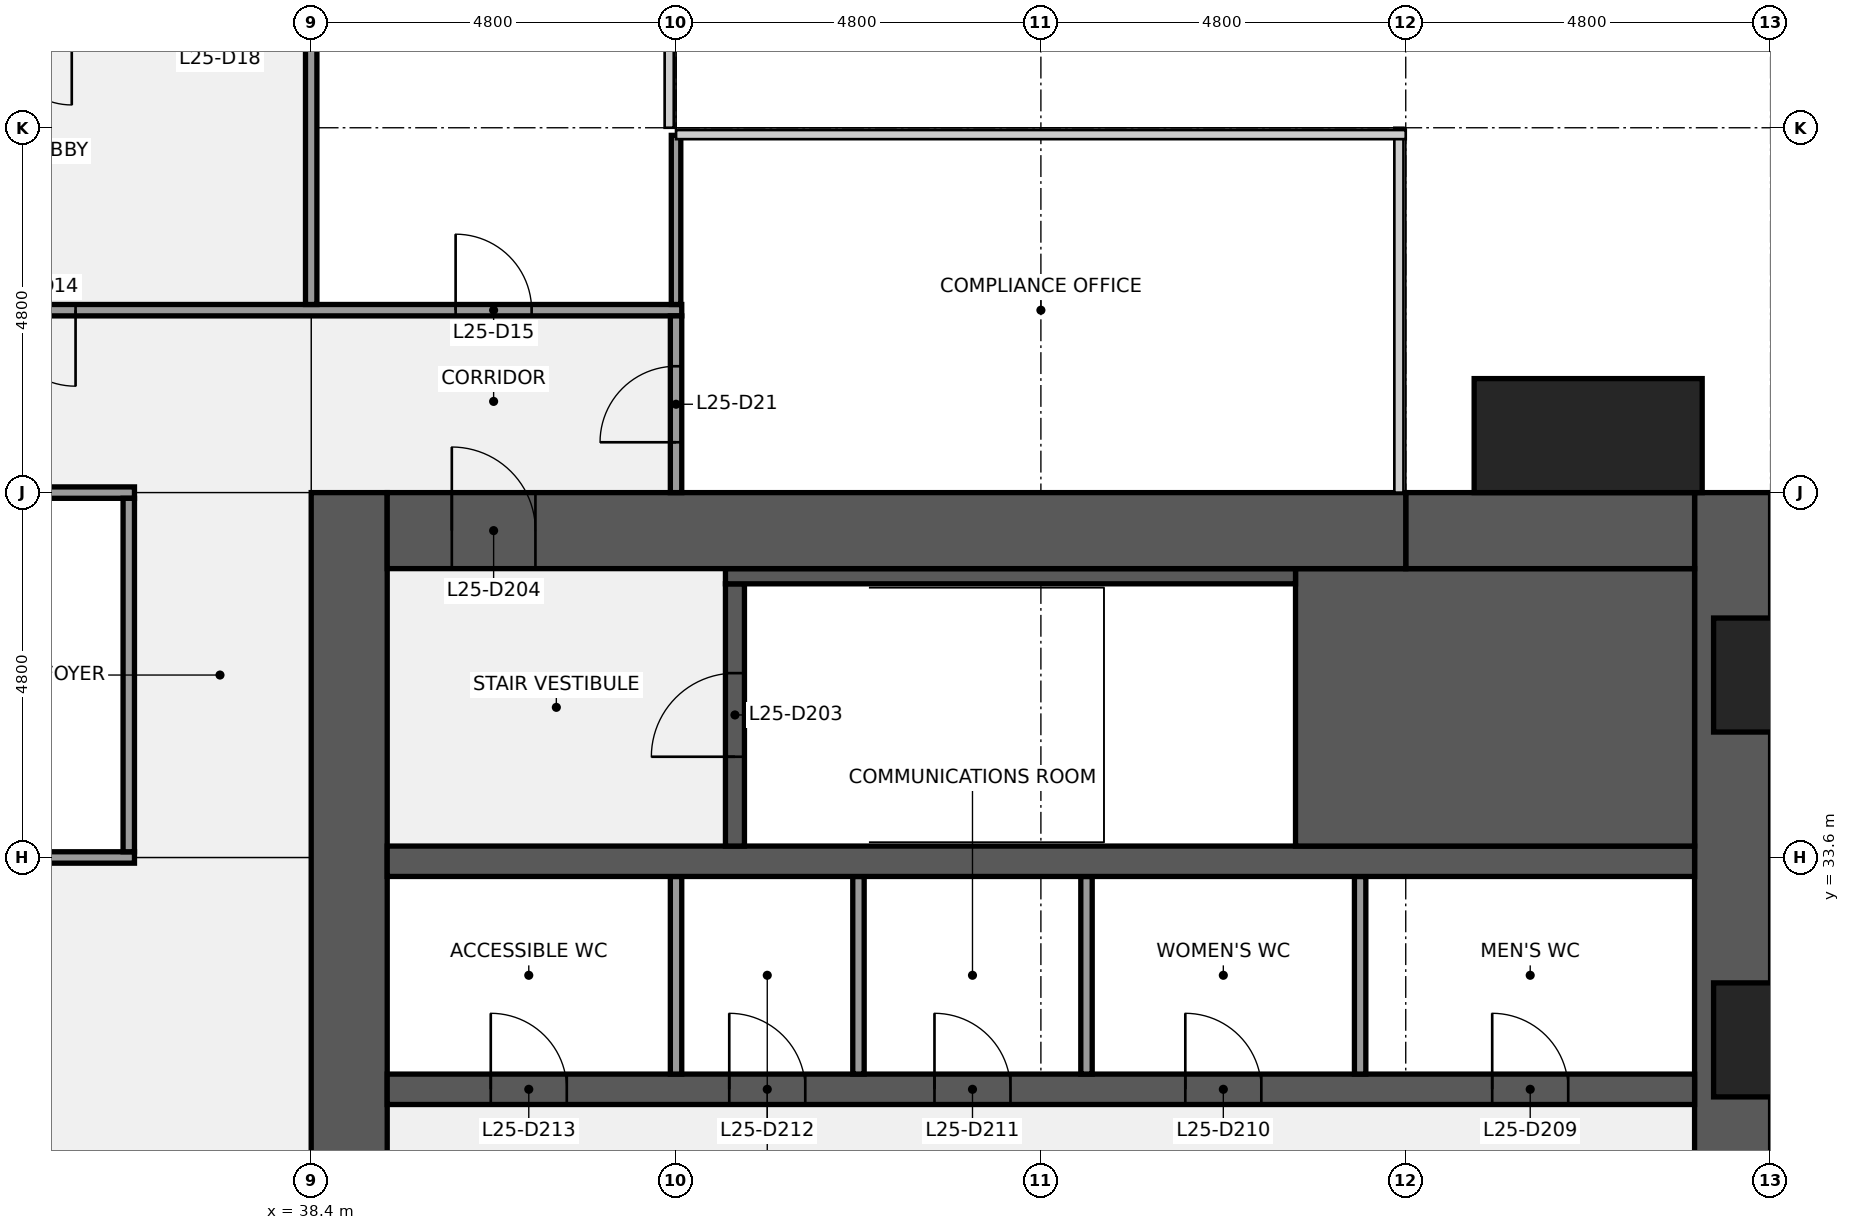
"""IFC4 building model, lengths in metres.
Left out: names, types, materials, properties, quantities, classifications, styles, units other than length and angle.
Written with IfcOpenShell. Run it as: python <this file> out.ifc"""

import sys

from ifc_helpers import new_model, si_unit, direction, frame, frame_2d, origin, origin_2d, place, context, subcontext, project, spatial, rectangle, extrude, element, fill, save


model = new_model("IFC4")
c1 = context("Model", 3, precision=1e-05, world=origin(), true_north=direction((0.0, 1.0)))
c2 = subcontext(c1, "Body", "Model", "MODEL_VIEW")
j1 = project(units=[si_unit("LENGTHUNIT", "METRE"), si_unit("PLANEANGLEUNIT", "RADIAN")], contexts=[c1])
p1 = place(None, origin())
s1 = spatial("IfcSite", under=j1, at=p1, CompositionType="ELEMENT")
p2 = place(p1, origin())
s2 = spatial("IfcBuilding", under=s1, at=p2, CompositionType="ELEMENT")
p3 = place(p2, frame((0.0, 0.0, 120.1)))
s3 = spatial("IfcBuildingStorey", under=s2, at=p3, CompositionType="ELEMENT", Elevation=120.1)
p4 = place(p3, frame((57.1, 38.4, 0.0), z_axis=(0.0, 0.0, 1.0), x_axis=(0.0, -1.0, 0.0)))
e1 = element("IfcWall", 1, at=p4, inside=s3, PredefinedType="SHEAR", context=c2, shape_type="SweptSolid", body=[
    extrude(rectangle(XDim=28.8, YDim=1.0, at=frame_2d((14.4, 0.0))), origin(), (0.0, 0.0, 1.0), 3.84),
])
p5 = place(p4, frame((18.45, 0.0, 0.9)))
e2 = element("IfcOpeningElement", 2, at=p5, cuts=e1, PredefinedType="OPENING", context=c2, shape_type="SweptSolid", body=[
    extrude(rectangle(XDim=1.5, YDim=1.5, at=frame_2d((0.75, 0.75))), frame((0.0, 0.51, 0.0), z_axis=(0.0, -1.0, 0.0), x_axis=(1.0, 0.0, 0.0)), (0.0, 0.0, 1.0), 1.02),
])
p6 = place(p4, frame((8.85, 0.0, 0.9)))
e3 = element("IfcOpeningElement", 3, at=p6, cuts=e1, PredefinedType="OPENING", context=c2, shape_type="SweptSolid", body=[
    extrude(rectangle(XDim=1.5, YDim=1.5, at=frame_2d((0.75, 0.75))), frame((0.0, 0.51, 0.0), z_axis=(0.0, -1.0, 0.0), x_axis=(1.0, 0.0, 0.0)), (0.0, 0.0, 1.0), 1.02),
])
p7 = place(p3, frame((38.9, 9.6, 0.0), z_axis=(0.0, 0.0, 1.0), x_axis=(0.0, 1.0, 0.0)))
e4 = element("IfcWall", 4, at=p7, inside=s3, PredefinedType="SHEAR", context=c2, shape_type="SweptSolid", body=[
    extrude(rectangle(XDim=28.8, YDim=1.0, at=frame_2d((14.4, 0.0))), origin(), (0.0, 0.0, 1.0), 3.84),
])
p8 = place(p7, frame((8.7, 0.0, 0.0)))
e5 = element("IfcOpeningElement", 5, at=p8, cuts=e4, PredefinedType="OPENING", context=c2, shape_type="SweptSolid", body=[
    extrude(rectangle(XDim=1.8, YDim=2.1, at=frame_2d((0.9, 1.05))), frame((0.0, 0.51, 0.0), z_axis=(0.0, -1.0, 0.0), x_axis=(1.0, 0.0, 0.0)), (0.0, 0.0, 1.0), 1.02),
])
p9 = place(p7, frame((18.3, 0.0, 0.0)))
e6 = element("IfcOpeningElement", 6, at=p9, cuts=e4, PredefinedType="OPENING", context=c2, shape_type="SweptSolid", body=[
    extrude(rectangle(XDim=1.8, YDim=2.1, at=frame_2d((0.9, 1.05))), frame((0.0, 0.51, 0.0), z_axis=(0.0, -1.0, 0.0), x_axis=(1.0, 0.0, 0.0)), (0.0, 0.0, 1.0), 1.02),
])
p10 = place(p3, frame((39.4, 30.55, 0.0), z_axis=(0.0, 0.0, 1.0), x_axis=(1.0, 0.0, 0.0)))
e7 = element("IfcWall", 7, at=p10, inside=s3, PredefinedType="SHEAR", context=c2, shape_type="SweptSolid", body=[
    extrude(rectangle(XDim=17.2, YDim=0.4, at=frame_2d((8.6, 0.0))), origin(), (0.0, 0.0, 1.0), 3.84),
])
p11 = place(p10, frame((14.538, 0.0, 0.0)))
e8 = element("IfcOpeningElement", 8, at=p11, cuts=e7, PredefinedType="OPENING", context=c2, shape_type="SweptSolid", body=[
    extrude(rectangle(XDim=1.0, YDim=2.1, at=frame_2d((0.5, 1.05))), frame((0.0, 0.21, 0.0), z_axis=(0.0, -1.0, 0.0), x_axis=(1.0, 0.0, 0.0)), (0.0, 0.0, 1.0), 0.42),
])
p12 = place(p10, frame((10.5, 0.0, 0.0)))
e9 = element("IfcOpeningElement", 9, at=p12, cuts=e7, PredefinedType="OPENING", context=c2, shape_type="SweptSolid", body=[
    extrude(rectangle(XDim=1.0, YDim=2.1, at=frame_2d((0.5, 1.05))), frame((0.0, 0.21, 0.0), z_axis=(0.0, -1.0, 0.0), x_axis=(1.0, 0.0, 0.0)), (0.0, 0.0, 1.0), 0.42),
])
p13 = place(p10, frame((7.2, 0.0, 0.0)))
e10 = element("IfcOpeningElement", 10, at=p13, cuts=e7, PredefinedType="OPENING", context=c2, shape_type="SweptSolid", body=[
    extrude(rectangle(XDim=1.0, YDim=2.1, at=frame_2d((0.5, 1.05))), frame((0.0, 0.21, 0.0), z_axis=(0.0, -1.0, 0.0), x_axis=(1.0, 0.0, 0.0)), (0.0, 0.0, 1.0), 0.42),
])
p14 = place(p10, frame((4.5, 0.0, 0.0)))
e11 = element("IfcOpeningElement", 11, at=p14, cuts=e7, PredefinedType="OPENING", context=c2, shape_type="SweptSolid", body=[
    extrude(rectangle(XDim=1.0, YDim=2.1, at=frame_2d((0.5, 1.05))), frame((0.0, 0.21, 0.0), z_axis=(0.0, -1.0, 0.0), x_axis=(1.0, 0.0, 0.0)), (0.0, 0.0, 1.0), 0.42),
])
p15 = place(p10, frame((1.363, 0.0, 0.0)))
e12 = element("IfcOpeningElement", 12, at=p15, cuts=e7, PredefinedType="OPENING", context=c2, shape_type="SweptSolid", body=[
    extrude(rectangle(XDim=1.0, YDim=2.1, at=frame_2d((0.5, 1.05))), frame((0.0, 0.21, 0.0), z_axis=(0.0, -1.0, 0.0), x_axis=(1.0, 0.0, 0.0)), (0.0, 0.0, 1.0), 0.42),
])
for number, where, z_axis, x_axis in (
    (13, (52.2, 30.75, 0.0), (0.0, 0.0, 1.0), (0.0, 1.0, 0.0)),
    (14, (48.6, 30.75, 0.0), (0.0, 0.0, 1.0), (0.0, 1.0, 0.0)),
    (15, (45.6, 30.75, 0.0), (0.0, 0.0, 1.0), (0.0, 1.0, 0.0)),
    (16, (43.2, 30.75, 0.0), (0.0, 0.0, 1.0), (0.0, 1.0, 0.0)),
):
    element("IfcWall", number, at=place(p3, frame(where, z_axis=z_axis, x_axis=x_axis)), inside=s3, PredefinedType="PARTITIONING", context=c2, shape_type="SweptSolid", body=[
        extrude(rectangle(XDim=2.6, YDim=0.15, at=frame_2d((1.3, 0.0))), origin(), (0.0, 0.0, 1.0), 3.84),
    ])
p16 = place(p3, frame((39.4, 33.55, 0.0), z_axis=(0.0, 0.0, 1.0), x_axis=(1.0, 0.0, 0.0)))
e17 = element("IfcWall", 17, at=p16, inside=s3, PredefinedType="SHEAR", context=c2, shape_type="SweptSolid", body=[
    extrude(rectangle(XDim=17.2, YDim=0.4, at=frame_2d((8.6, 0.0))), origin(), (0.0, 0.0, 1.0), 3.84),
])
p17 = place(p3, frame((51.35, 35.575, 0.0), z_axis=(0.0, 0.0, 1.0), x_axis=(1.0, 0.0, 0.0)))
e18 = element("IfcWall", 18, at=p17, inside=s3, PredefinedType="SHEAR", context=c2, shape_type="SweptSolid", body=[
    extrude(rectangle(XDim=5.25, YDim=3.65, at=frame_2d((2.625, 0.0))), origin(), (0.0, 0.0, 1.0), 3.84),
])
p18 = place(p3, frame((43.975, 33.75, 0.0), z_axis=(0.0, 0.0, 1.0), x_axis=(0.0, 1.0, 0.0)))
e19 = element("IfcWall", 19, at=p18, inside=s3, PredefinedType="SHEAR", context=c2, shape_type="SweptSolid", body=[
    extrude(rectangle(XDim=3.45, YDim=0.25, at=frame_2d((1.725, 0.0))), origin(), (0.0, 0.0, 1.0), 3.84),
])
p19 = place(p18, frame((1.175, 0.0, 0.0)))
e20 = element("IfcOpeningElement", 20, at=p19, cuts=e19, PredefinedType="OPENING", context=c2, shape_type="SweptSolid", body=[
    extrude(rectangle(XDim=1.1, YDim=2.1, at=frame_2d((0.55, 1.05))), frame((0.0, 0.135, 0.0), z_axis=(0.0, -1.0, 0.0), x_axis=(1.0, 0.0, 0.0)), (0.0, 0.0, 1.0), 0.27),
])
p20 = place(p3, frame((43.85, 37.3, 0.0), z_axis=(0.0, 0.0, 1.0), x_axis=(1.0, 0.0, 0.0)))
e21 = element("IfcWall", 21, at=p20, inside=s3, PredefinedType="SHEAR", context=c2, shape_type="SweptSolid", body=[
    extrude(rectangle(XDim=7.5, YDim=0.2, at=frame_2d((3.75, 0.0))), origin(), (0.0, 0.0, 1.0), 3.84),
])
p21 = place(p3, frame((52.8, 37.9, 0.0), z_axis=(0.0, 0.0, 1.0), x_axis=(1.0, 0.0, 0.0)))
e22 = element("IfcWall", 22, at=p21, inside=s3, PredefinedType="SHEAR", context=c2, shape_type="SweptSolid", body=[
    extrude(rectangle(XDim=3.8, YDim=1.0, at=frame_2d((1.9, 0.0))), origin(), (0.0, 0.0, 1.0), 3.84),
])
p22 = place(p3, frame((39.4, 37.9, 0.0), z_axis=(0.0, 0.0, 1.0), x_axis=(1.0, 0.0, 0.0)))
e23 = element("IfcWall", 23, at=p22, inside=s3, PredefinedType="SHEAR", context=c2, shape_type="SweptSolid", body=[
    extrude(rectangle(XDim=13.4, YDim=1.0, at=frame_2d((6.7, 0.0))), origin(), (0.0, 0.0, 1.0), 3.84),
])
p23 = place(p22, frame((0.85, 0.0, 0.0)))
e24 = element("IfcOpeningElement", 24, at=p23, cuts=e23, PredefinedType="OPENING", context=c2, shape_type="SweptSolid", body=[
    extrude(rectangle(XDim=1.1, YDim=2.1, at=frame_2d((0.55, 1.05))), frame((0.0, 0.51, 0.0), z_axis=(0.0, -1.0, 0.0), x_axis=(1.0, 0.0, 0.0)), (0.0, 0.0, 1.0), 1.02),
])
p24 = place(p3, frame((33.675, 33.6, 0.0), z_axis=(0.0, 0.0, 1.0), x_axis=(1.0, 0.0, 0.0)))
e25 = element("IfcWall", 25, at=p24, inside=s3, PredefinedType="PARTITIONING", context=c2, shape_type="SweptSolid", body=[
    extrude(rectangle(XDim=2.4, YDim=0.15, at=frame_2d((1.2, 0.0))), origin(), (0.0, 0.0, 1.0), 2.936),
])
p25 = place(p3, frame((21.525, 38.4, 0.0), z_axis=(0.0, 0.0, 1.0), x_axis=(1.0, 0.0, 0.0)))
e26 = element("IfcWall", 26, at=p25, inside=s3, PredefinedType="PARTITIONING", context=c2, shape_type="SweptSolid", body=[
    extrude(rectangle(XDim=14.55, YDim=0.15, at=frame_2d((7.275, 0.0))), origin(), (0.0, 0.0, 1.0), 2.936),
])
p26 = place(p25, frame((3.175, 0.0, 0.0)))
e27 = element("IfcOpeningElement", 27, at=p26, cuts=e26, PredefinedType="OPENING", context=c2, shape_type="SweptSolid", body=[
    extrude(rectangle(XDim=1.0, YDim=2.1, at=frame_2d((0.5, 1.05))), frame((0.0, 0.085, 0.0), z_axis=(0.0, -1.0, 0.0), x_axis=(1.0, 0.0, 0.0)), (0.0, 0.0, 1.0), 0.17),
])
p27 = place(p25, frame((10.375, 0.0, 0.0)))
e28 = element("IfcOpeningElement", 28, at=p27, cuts=e26, PredefinedType="OPENING", context=c2, shape_type="SweptSolid", body=[
    extrude(rectangle(XDim=1.0, YDim=2.1, at=frame_2d((0.5, 1.05))), frame((0.0, 0.085, 0.0), z_axis=(0.0, -1.0, 0.0), x_axis=(1.0, 0.0, 0.0)), (0.0, 0.0, 1.0), 0.17),
])
p28 = place(p3, frame((14.325, 40.8, 0.0), z_axis=(0.0, 0.0, 1.0), x_axis=(1.0, 0.0, 0.0)))
e29 = element("IfcWall", 29, at=p28, inside=s3, PredefinedType="PARTITIONING", context=c2, shape_type="SweptSolid", body=[
    extrude(rectangle(XDim=28.95, YDim=0.15, at=frame_2d((14.475, 0.0))), origin(), (0.0, 0.0, 1.0), 2.936),
])
p29 = place(p28, frame((1.975, 0.0, 0.0)))
e30 = element("IfcOpeningElement", 30, at=p29, cuts=e29, PredefinedType="OPENING", context=c2, shape_type="SweptSolid", body=[
    extrude(rectangle(XDim=1.0, YDim=2.1, at=frame_2d((0.5, 1.05))), frame((0.0, 0.085, 0.0), z_axis=(0.0, -1.0, 0.0), x_axis=(1.0, 0.0, 0.0)), (0.0, 0.0, 1.0), 0.17),
])
p30 = place(p28, frame((9.175, 0.0, 0.0)))
e31 = element("IfcOpeningElement", 31, at=p30, cuts=e29, PredefinedType="OPENING", context=c2, shape_type="SweptSolid", body=[
    extrude(rectangle(XDim=1.0, YDim=2.1, at=frame_2d((0.5, 1.05))), frame((0.0, 0.085, 0.0), z_axis=(0.0, -1.0, 0.0), x_axis=(1.0, 0.0, 0.0)), (0.0, 0.0, 1.0), 0.17),
])
p31 = place(p28, frame((15.175, 0.0, 0.0)))
e32 = element("IfcOpeningElement", 32, at=p31, cuts=e29, PredefinedType="OPENING", context=c2, shape_type="SweptSolid", body=[
    extrude(rectangle(XDim=1.0, YDim=2.1, at=frame_2d((0.5, 1.05))), frame((0.0, 0.085, 0.0), z_axis=(0.0, -1.0, 0.0), x_axis=(1.0, 0.0, 0.0)), (0.0, 0.0, 1.0), 0.17),
])
p32 = place(p28, frame((19.975, 0.0, 0.0)))
e33 = element("IfcOpeningElement", 33, at=p32, cuts=e29, PredefinedType="OPENING", context=c2, shape_type="SweptSolid", body=[
    extrude(rectangle(XDim=1.0, YDim=2.1, at=frame_2d((0.5, 1.05))), frame((0.0, 0.085, 0.0), z_axis=(0.0, -1.0, 0.0), x_axis=(1.0, 0.0, 0.0)), (0.0, 0.0, 1.0), 0.17),
])
p33 = place(p28, frame((25.975, 0.0, 0.0)))
e34 = element("IfcOpeningElement", 34, at=p33, cuts=e29, PredefinedType="OPENING", context=c2, shape_type="SweptSolid", body=[
    extrude(rectangle(XDim=1.0, YDim=2.1, at=frame_2d((0.5, 1.05))), frame((0.0, 0.085, 0.0), z_axis=(0.0, -1.0, 0.0), x_axis=(1.0, 0.0, 0.0)), (0.0, 0.0, 1.0), 0.17),
])
p34 = place(p3, frame((36.0, 33.675, 0.0), z_axis=(0.0, 0.0, 1.0), x_axis=(0.0, 1.0, 0.0)))
e35 = element("IfcWall", 35, at=p34, inside=s3, PredefinedType="PARTITIONING", context=c2, shape_type="SweptSolid", body=[
    extrude(rectangle(XDim=4.65, YDim=0.15, at=frame_2d((2.325, 0.0))), origin(), (0.0, 0.0, 1.0), 2.936),
])
p35 = place(p3, frame((38.4, 40.875, 0.0), z_axis=(0.0, 0.0, 1.0), x_axis=(0.0, 1.0, 0.0)))
e36 = element("IfcWall", 36, at=p35, inside=s3, PredefinedType="PARTITIONING", context=c2, shape_type="SweptSolid", body=[
    extrude(rectangle(XDim=3.45, YDim=0.15, at=frame_2d((1.725, 0.0))), origin(), (0.0, 0.0, 1.0), 2.936),
])
p36 = place(p3, frame((43.2, 40.875, 0.0), z_axis=(0.0, 0.0, 1.0), x_axis=(0.0, 1.0, 0.0)))
e37 = element("IfcWall", 37, at=p36, inside=s3, PredefinedType="PARTITIONING", context=c2, shape_type="SweptSolid", body=[
    extrude(rectangle(XDim=2.225, YDim=0.125, at=frame_2d((1.113, 0.0))), origin(), (0.0, 0.0, 1.0), 2.936),
])
p37 = place(p3, frame((43.2, 38.4, 0.0), z_axis=(0.0, 0.0, 1.0), x_axis=(0.0, 1.0, 0.0)))
e38 = element("IfcWall", 38, at=p37, inside=s3, PredefinedType="PARTITIONING", context=c2, shape_type="SweptSolid", body=[
    extrude(rectangle(XDim=2.325, YDim=0.15, at=frame_2d((1.163, 0.0))), origin(), (0.0, 0.0, 1.0), 2.936),
])
p38 = place(p37, frame((0.663, 0.0, 0.0)))
e39 = element("IfcOpeningElement", 39, at=p38, cuts=e38, PredefinedType="OPENING", context=c2, shape_type="SweptSolid", body=[
    extrude(rectangle(XDim=1.0, YDim=2.1, at=frame_2d((0.5, 1.05))), frame((0.0, 0.085, 0.0), z_axis=(0.0, -1.0, 0.0), x_axis=(1.0, 0.0, 0.0)), (0.0, 0.0, 1.0), 0.17),
])
p39 = place(p3, frame((55.2, 39.15, 0.0), z_axis=(0.0, 0.0, 1.0), x_axis=(1.0, 0.0, 0.0)))
e40 = element("IfcColumn", 40, at=p39, inside=s3, PredefinedType="PILASTER", context=c2, shape_type="SweptSolid", body=[
    extrude(rectangle(XDim=3.0, YDim=1.5, at=origin_2d()), origin(), (0.0, 0.0, 1.0), 4.0),
])
p40 = place(p19, origin())
e41 = element("IfcDoor", 41, at=p40, inside=s3, OperationType="SINGLE_SWING_LEFT", PredefinedType="DOOR", context=c2, shape_type="SweptSolid", body=[
    extrude(rectangle(XDim=1.1, YDim=2.1, at=frame_2d((0.55, 1.05))), frame((0.0, 0.025, 0.0), z_axis=(0.0, -1.0, 0.0), x_axis=(1.0, 0.0, 0.0)), (0.0, 0.0, 1.0), 0.05),
])
fill(e20, e41)
p41 = place(p23, origin())
e42 = element("IfcDoor", 42, at=p41, inside=s3, OperationType="SINGLE_SWING_LEFT", PredefinedType="DOOR", context=c2, shape_type="SweptSolid", body=[
    extrude(rectangle(XDim=1.1, YDim=2.1, at=frame_2d((0.55, 1.05))), frame((0.0, 0.025, 0.0), z_axis=(0.0, -1.0, 0.0), x_axis=(1.0, 0.0, 0.0)), (0.0, 0.0, 1.0), 0.05),
])
fill(e24, e42)
p42 = place(p11, origin())
e43 = element("IfcDoor", 43, at=p42, inside=s3, OperationType="SINGLE_SWING_LEFT", PredefinedType="DOOR", context=c2, shape_type="SweptSolid", body=[
    extrude(rectangle(XDim=1.0, YDim=2.1, at=frame_2d((0.5, 1.05))), frame((0.0, 0.025, 0.0), z_axis=(0.0, -1.0, 0.0), x_axis=(1.0, 0.0, 0.0)), (0.0, 0.0, 1.0), 0.05),
])
fill(e8, e43)
p43 = place(p12, origin())
e44 = element("IfcDoor", 44, at=p43, inside=s3, OperationType="SINGLE_SWING_LEFT", PredefinedType="DOOR", context=c2, shape_type="SweptSolid", body=[
    extrude(rectangle(XDim=1.0, YDim=2.1, at=frame_2d((0.5, 1.05))), frame((0.0, 0.025, 0.0), z_axis=(0.0, -1.0, 0.0), x_axis=(1.0, 0.0, 0.0)), (0.0, 0.0, 1.0), 0.05),
])
fill(e9, e44)
p44 = place(p13, origin())
e45 = element("IfcDoor", 45, at=p44, inside=s3, OperationType="SINGLE_SWING_LEFT", PredefinedType="DOOR", context=c2, shape_type="SweptSolid", body=[
    extrude(rectangle(XDim=1.0, YDim=2.1, at=frame_2d((0.5, 1.05))), frame((0.0, 0.025, 0.0), z_axis=(0.0, -1.0, 0.0), x_axis=(1.0, 0.0, 0.0)), (0.0, 0.0, 1.0), 0.05),
])
fill(e10, e45)
p45 = place(p14, origin())
e46 = element("IfcDoor", 46, at=p45, inside=s3, OperationType="SINGLE_SWING_LEFT", PredefinedType="DOOR", context=c2, shape_type="SweptSolid", body=[
    extrude(rectangle(XDim=1.0, YDim=2.1, at=frame_2d((0.5, 1.05))), frame((0.0, 0.025, 0.0), z_axis=(0.0, -1.0, 0.0), x_axis=(1.0, 0.0, 0.0)), (0.0, 0.0, 1.0), 0.05),
])
fill(e11, e46)
p46 = place(p15, origin())
e47 = element("IfcDoor", 47, at=p46, inside=s3, OperationType="SINGLE_SWING_LEFT", PredefinedType="DOOR", context=c2, shape_type="SweptSolid", body=[
    extrude(rectangle(XDim=1.0, YDim=2.1, at=frame_2d((0.5, 1.05))), frame((0.0, 0.025, 0.0), z_axis=(0.0, -1.0, 0.0), x_axis=(1.0, 0.0, 0.0)), (0.0, 0.0, 1.0), 0.05),
])
fill(e12, e47)
p47 = place(p32, origin())
e48 = element("IfcDoor", 48, at=p47, inside=s3, OperationType="SINGLE_SWING_RIGHT", PredefinedType="DOOR", context=c2, shape_type="SweptSolid", body=[
    extrude(rectangle(XDim=1.0, YDim=2.1, at=frame_2d((0.5, 1.05))), frame((0.0, 0.025, 0.0), z_axis=(0.0, -1.0, 0.0), x_axis=(1.0, 0.0, 0.0)), (0.0, 0.0, 1.0), 0.05),
])
fill(e33, e48)
p48 = place(p33, origin())
e49 = element("IfcDoor", 49, at=p48, inside=s3, OperationType="SINGLE_SWING_LEFT", PredefinedType="DOOR", context=c2, shape_type="SweptSolid", body=[
    extrude(rectangle(XDim=1.0, YDim=2.1, at=frame_2d((0.5, 1.05))), frame((0.0, 0.025, 0.0), z_axis=(0.0, -1.0, 0.0), x_axis=(1.0, 0.0, 0.0)), (0.0, 0.0, 1.0), 0.05),
])
fill(e34, e49)
p49 = place(p38, origin())
e50 = element("IfcDoor", 50, at=p49, inside=s3, OperationType="SINGLE_SWING_LEFT", PredefinedType="DOOR", context=c2, shape_type="SweptSolid", body=[
    extrude(rectangle(XDim=1.0, YDim=2.1, at=frame_2d((0.5, 1.05))), frame((0.0, 0.025, 0.0), z_axis=(0.0, -1.0, 0.0), x_axis=(1.0, 0.0, 0.0)), (0.0, 0.0, 1.0), 0.05),
])
fill(e39, e50)
save(model, sys.argv[1])
